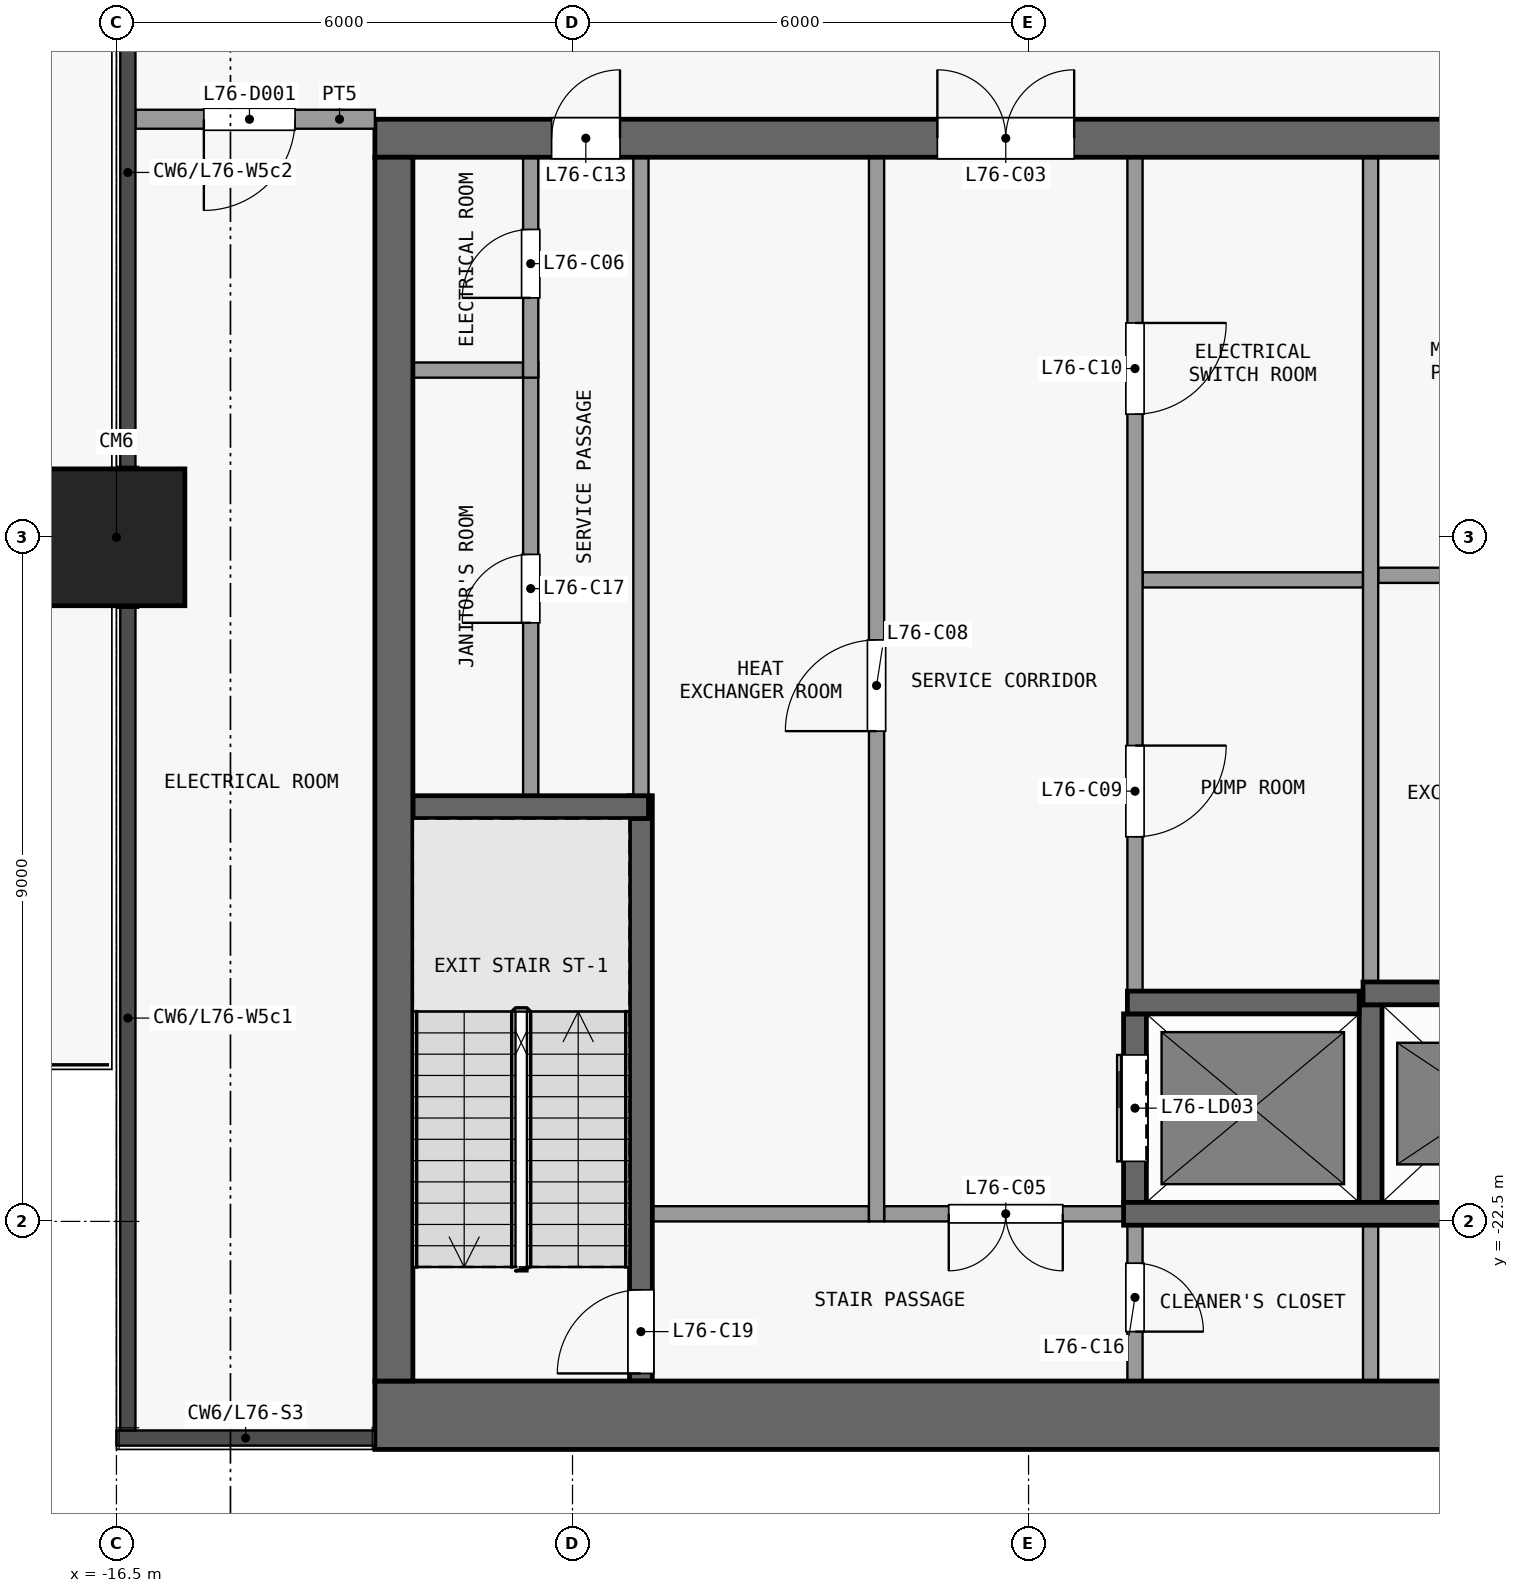
"""IFC4 building model, lengths in metres.
Left out: names, types, materials, properties, quantities, classifications, styles, units other than length and angle.
Written with IfcOpenShell. Run it as: python <this file> out.ifc"""

import sys

from ifc_helpers import new_model, si_unit, direction, frame, frame_2d, origin, origin_2d, place, context, subcontext, project, spatial, rectangle, extrude, element, fill, save


model = new_model("IFC4")
c1 = context("Model", 3, precision=1e-05, world=origin(), true_north=direction((0.0, 1.0)))
c2 = subcontext(c1, "Body", "Model", "MODEL_VIEW")
j1 = project(units=[si_unit("LENGTHUNIT", "METRE"), si_unit("PLANEANGLEUNIT", "RADIAN")], contexts=[c1])
p1 = place(None, origin())
s1 = spatial("IfcSite", under=j1, at=p1, CompositionType="ELEMENT")
p2 = place(p1, origin())
s2 = spatial("IfcBuilding", under=s1, at=p2, CompositionType="ELEMENT")
p3 = place(p2, frame((0.0, 0.0, 298.7)))
s3 = spatial("IfcBuildingStorey", under=s2, at=p3, CompositionType="ELEMENT", Elevation=298.7)
p4 = place(p3, frame((-16.5, -13.5, 0.0), z_axis=(0.0, 0.0, 1.0), x_axis=(1.0, 0.0, 0.0)))
e1 = element("IfcColumn", 1, at=p4, inside=s3, PredefinedType="COLUMN", context=c2, shape_type="SweptSolid", body=[
    extrude(rectangle(XDim=1.8, YDim=1.8, at=origin_2d()), origin(), (0.0, 0.0, 1.0), 4.5),
])
p5 = place(p3, frame((-13.1, -25.05, 0.0), z_axis=(0.0, 0.0, 1.0), x_axis=(1.0, 0.0, 0.0)))
e2 = element("IfcWall", 2, at=p5, inside=s3, PredefinedType="SHEAR", context=c2, shape_type="SweptSolid", body=[
    extrude(rectangle(XDim=26.2, YDim=0.9, at=frame_2d((13.1, 0.0))), origin(), (0.0, 0.0, 1.0), 4.2),
])
p6 = place(p3, frame((-13.1, -8.25, 0.0), z_axis=(0.0, 0.0, 1.0), x_axis=(1.0, 0.0, 0.0)))
e3 = element("IfcWall", 3, at=p6, inside=s3, PredefinedType="SHEAR", context=c2, shape_type="SweptSolid", body=[
    extrude(rectangle(XDim=26.2, YDim=0.5, at=frame_2d((13.1, 0.0))), origin(), (0.0, 0.0, 1.0), 4.2),
])
p7 = place(p6, frame((7.4, 0.0, 0.0)))
e4 = element("IfcOpeningElement", 4, at=p7, cuts=e3, PredefinedType="OPENING", context=c2, shape_type="SweptSolid", body=[
    extrude(rectangle(XDim=1.8, YDim=2.1, at=frame_2d((0.9, 1.05))), frame((0.0, 0.26, 0.0), z_axis=(0.0, -1.0, 0.0), x_axis=(1.0, 0.0, 0.0)), (0.0, 0.0, 1.0), 0.52),
])
p8 = place(p6, frame((17.0, 0.0, 0.0)))
e5 = element("IfcOpeningElement", 5, at=p8, cuts=e3, PredefinedType="OPENING", context=c2, shape_type="SweptSolid", body=[
    extrude(rectangle(XDim=1.8, YDim=2.1, at=frame_2d((0.9, 1.05))), frame((0.0, 0.26, 0.0), z_axis=(0.0, -1.0, 0.0), x_axis=(1.0, 0.0, 0.0)), (0.0, 0.0, 1.0), 0.52),
])
p9 = place(p6, frame((2.325, 0.0, 0.0)))
e6 = element("IfcOpeningElement", 6, at=p9, cuts=e3, PredefinedType="OPENING", context=c2, shape_type="SweptSolid", body=[
    extrude(rectangle(XDim=0.9, YDim=2.1, at=frame_2d((0.45, 1.05))), frame((0.0, 0.26, 0.0), z_axis=(0.0, -1.0, 0.0), x_axis=(1.0, 0.0, 0.0)), (0.0, 0.0, 1.0), 0.52),
])
p10 = place(p6, frame((22.975, 0.0, 0.0)))
e7 = element("IfcOpeningElement", 7, at=p10, cuts=e3, PredefinedType="OPENING", context=c2, shape_type="SweptSolid", body=[
    extrude(rectangle(XDim=0.9, YDim=2.1, at=frame_2d((0.45, 1.05))), frame((0.0, 0.26, 0.0), z_axis=(0.0, -1.0, 0.0), x_axis=(1.0, 0.0, 0.0)), (0.0, 0.0, 1.0), 0.52),
])
p11 = place(p3, frame((-12.85, -24.6, 0.0), z_axis=(0.0, 0.0, 1.0), x_axis=(0.0, 1.0, 0.0)))
e8 = element("IfcWall", 8, at=p11, inside=s3, PredefinedType="SHEAR", context=c2, shape_type="SweptSolid", body=[
    extrude(rectangle(XDim=16.1, YDim=0.5, at=frame_2d((8.05, 0.0))), origin(), (0.0, 0.0, 1.0), 4.2),
])
p12 = place(p3, frame((-9.45, -22.4, 0.0), z_axis=(0.0, 0.0, 1.0), x_axis=(1.0, 0.0, 0.0)))
e9 = element("IfcWall", 9, at=p12, inside=s3, PredefinedType="PARTITIONING", context=c2, shape_type="SweptSolid", body=[
    extrude(rectangle(XDim=2.85, YDim=0.2, at=frame_2d((1.425, 0.0))), origin(), (0.0, 0.0, 1.0), 4.2),
])
p13 = place(p3, frame((-3.25, -22.4, 0.0), z_axis=(0.0, 0.0, 1.0), x_axis=(-1.0, 0.0, 0.0)))
e10 = element("IfcWall", 10, at=p13, inside=s3, PredefinedType="PARTITIONING", context=c2, shape_type="SweptSolid", body=[
    extrude(rectangle(XDim=3.15, YDim=0.2, at=frame_2d((1.575, 0.0))), origin(), (0.0, 0.0, 1.0), 4.2),
])
p14 = place(p13, frame((0.8, 0.0, 0.0)))
e11 = element("IfcOpeningElement", 11, at=p14, cuts=e10, PredefinedType="OPENING", context=c2, shape_type="SweptSolid", body=[
    extrude(rectangle(XDim=1.5, YDim=2.1, at=frame_2d((0.75, 1.05))), frame((0.0, 0.11, 0.0), z_axis=(0.0, -1.0, 0.0), x_axis=(1.0, 0.0, 0.0)), (0.0, 0.0, 1.0), 0.22),
])
p15 = place(p3, frame((-3.25, -22.4, 0.0), z_axis=(0.0, 0.0, 1.0), x_axis=(1.0, 0.0, 0.0)))
e12 = element("IfcWall", 12, at=p15, inside=s3, PredefinedType="SHEAR", context=c2, shape_type="SweptSolid", body=[
    extrude(rectangle(XDim=6.5, YDim=0.3, at=frame_2d((3.25, 0.0))), origin(), (0.0, 0.0, 1.0), 4.2),
])
p16 = place(p3, frame((-3.2, -19.62, 0.0), z_axis=(0.0, 0.0, 1.0), x_axis=(1.0, 0.0, 0.0)))
e13 = element("IfcWall", 13, at=p16, inside=s3, PredefinedType="SHEAR", context=c2, shape_type="SweptSolid", body=[
    extrude(rectangle(XDim=3.05, YDim=0.3, at=frame_2d((1.525, 0.0))), origin(), (0.0, 0.0, 1.0), 4.2),
])
p17 = place(p3, frame((-0.1, -19.5, 0.0), z_axis=(0.0, 0.0, 1.0), x_axis=(1.0, 0.0, 0.0)))
e14 = element("IfcWall", 14, at=p17, inside=s3, PredefinedType="SHEAR", context=c2, shape_type="SweptSolid", body=[
    extrude(rectangle(XDim=3.3, YDim=0.3, at=frame_2d((1.65, 0.0))), origin(), (0.0, 0.0, 1.0), 4.2),
])
p18 = place(p3, frame((-12.6, -17.05, 0.0), z_axis=(0.0, 0.0, 1.0), x_axis=(1.0, 0.0, 0.0)))
e15 = element("IfcWall", 15, at=p18, inside=s3, PredefinedType="SHEAR", context=c2, shape_type="SweptSolid", body=[
    extrude(rectangle(XDim=3.1, YDim=0.3, at=frame_2d((1.55, 0.0))), origin(), (0.0, 0.0, 1.0), 4.2),
])
for number, where, z_axis, x_axis in (
    (16, (-3.0, -14.06, 0.0), (0.0, 0.0, 1.0), (1.0, 0.0, 0.0)),
    (17, (0.1, -14.0, 0.0), (0.0, 0.0, 1.0), (1.0, 0.0, 0.0)),
):
    element("IfcWall", number, at=place(p3, frame(where, z_axis=z_axis, x_axis=x_axis)), inside=s3, PredefinedType="PARTITIONING", context=c2, shape_type="SweptSolid", body=[
        extrude(rectangle(XDim=2.9, YDim=0.2, at=frame_2d((1.45, 0.0))), origin(), (0.0, 0.0, 1.0), 4.2),
    ])
p19 = place(p3, frame((-12.6, -11.3, 0.0), z_axis=(0.0, 0.0, 1.0), x_axis=(1.0, 0.0, 0.0)))
e18 = element("IfcWall", 18, at=p19, inside=s3, PredefinedType="PARTITIONING", context=c2, shape_type="SweptSolid", body=[
    extrude(rectangle(XDim=1.45, YDim=0.2, at=frame_2d((0.725, 0.0))), origin(), (0.0, 0.0, 1.0), 4.2),
])
p20 = place(p3, frame((-11.05, -16.9, 0.0), z_axis=(0.0, 0.0, 1.0), x_axis=(0.0, 1.0, 0.0)))
e19 = element("IfcWall", 19, at=p20, inside=s3, PredefinedType="PARTITIONING", context=c2, shape_type="SweptSolid", body=[
    extrude(rectangle(XDim=5.7, YDim=0.2, at=frame_2d((2.85, 0.0))), origin(), (0.0, 0.0, 1.0), 4.2),
])
p21 = place(p20, frame((2.275, 0.0, 0.0)))
e20 = element("IfcOpeningElement", 20, at=p21, cuts=e19, PredefinedType="OPENING", context=c2, shape_type="SweptSolid", body=[
    extrude(rectangle(XDim=0.9, YDim=2.1, at=frame_2d((0.45, 1.05))), frame((0.0, 0.11, 0.0), z_axis=(0.0, -1.0, 0.0), x_axis=(1.0, 0.0, 0.0)), (0.0, 0.0, 1.0), 0.22),
])
p22 = place(p3, frame((-11.05, -11.4, 0.0), z_axis=(0.0, 0.0, 1.0), x_axis=(0.0, 1.0, 0.0)))
e21 = element("IfcWall", 21, at=p22, inside=s3, PredefinedType="PARTITIONING", context=c2, shape_type="SweptSolid", body=[
    extrude(rectangle(XDim=2.9, YDim=0.2, at=frame_2d((1.45, 0.0))), origin(), (0.0, 0.0, 1.0), 4.2),
])
p23 = place(p22, frame((1.05, 0.0, 0.0)))
e22 = element("IfcOpeningElement", 22, at=p23, cuts=e21, PredefinedType="OPENING", context=c2, shape_type="SweptSolid", body=[
    extrude(rectangle(XDim=0.9, YDim=2.1, at=frame_2d((0.45, 1.05))), frame((0.0, 0.11, 0.0), z_axis=(0.0, -1.0, 0.0), x_axis=(1.0, 0.0, 0.0)), (0.0, 0.0, 1.0), 0.22),
])
p24 = place(p3, frame((-9.6, -24.6, 0.0), z_axis=(0.0, 0.0, 1.0), x_axis=(0.0, 1.0, 0.0)))
e23 = element("IfcWall", 23, at=p24, inside=s3, PredefinedType="SHEAR", context=c2, shape_type="SweptSolid", body=[
    extrude(rectangle(XDim=7.7, YDim=0.3, at=frame_2d((3.85, 0.0))), origin(), (0.0, 0.0, 1.0), 4.2),
])
p25 = place(p24, frame((0.1, 0.0, 0.0)))
e24 = element("IfcOpeningElement", 24, at=p25, cuts=e23, PredefinedType="OPENING", context=c2, shape_type="SweptSolid", body=[
    extrude(rectangle(XDim=1.1, YDim=2.1, at=frame_2d((0.55, 1.05))), frame((0.0, 0.16, 0.0), z_axis=(0.0, -1.0, 0.0), x_axis=(1.0, 0.0, 0.0)), (0.0, 0.0, 1.0), 0.32),
])
p26 = place(p3, frame((-9.6, -16.9, 0.0), z_axis=(0.0, 0.0, 1.0), x_axis=(0.0, 1.0, 0.0)))
e25 = element("IfcWall", 25, at=p26, inside=s3, PredefinedType="PARTITIONING", context=c2, shape_type="SweptSolid", body=[
    extrude(rectangle(XDim=8.4, YDim=0.2, at=frame_2d((4.2, 0.0))), origin(), (0.0, 0.0, 1.0), 4.2),
])
p27 = place(p3, frame((-6.5, -22.5, 0.0), z_axis=(0.0, 0.0, 1.0), x_axis=(0.0, 1.0, 0.0)))
e26 = element("IfcWall", 26, at=p27, inside=s3, PredefinedType="PARTITIONING", context=c2, shape_type="SweptSolid", body=[
    extrude(rectangle(XDim=14.0, YDim=0.2, at=frame_2d((7.0, 0.0))), origin(), (0.0, 0.0, 1.0), 4.2),
])
p28 = place(p27, frame((6.45, 0.0, 0.0)))
e27 = element("IfcOpeningElement", 27, at=p28, cuts=e26, PredefinedType="OPENING", context=c2, shape_type="SweptSolid", body=[
    extrude(rectangle(XDim=1.2, YDim=2.1, at=frame_2d((0.6, 1.05))), frame((0.0, 0.11, 0.0), z_axis=(0.0, -1.0, 0.0), x_axis=(1.0, 0.0, 0.0)), (0.0, 0.0, 1.0), 0.22),
])
p29 = place(p3, frame((-3.1, -22.55, 0.0), z_axis=(0.0, 0.0, 1.0), x_axis=(0.0, -1.0, 0.0)))
e28 = element("IfcWall", 28, at=p29, inside=s3, PredefinedType="PARTITIONING", context=c2, shape_type="SweptSolid", body=[
    extrude(rectangle(XDim=2.05, YDim=0.2, at=frame_2d((1.025, 0.0))), origin(), (0.0, 0.0, 1.0), 4.2),
])
p30 = place(p29, frame((0.5, 0.0, 0.0)))
e29 = element("IfcOpeningElement", 29, at=p30, cuts=e28, PredefinedType="OPENING", context=c2, shape_type="SweptSolid", body=[
    extrude(rectangle(XDim=0.9, YDim=2.1, at=frame_2d((0.45, 1.05))), frame((0.0, 0.11, 0.0), z_axis=(0.0, -1.0, 0.0), x_axis=(1.0, 0.0, 0.0)), (0.0, 0.0, 1.0), 0.22),
])
p31 = place(p3, frame((-3.1, -22.25, 0.0), z_axis=(0.0, 0.0, 1.0), x_axis=(0.0, 1.0, 0.0)))
e30 = element("IfcWall", 30, at=p31, inside=s3, PredefinedType="SHEAR", context=c2, shape_type="SweptSolid", body=[
    extrude(rectangle(XDim=2.48, YDim=0.3, at=frame_2d((1.24, 0.0))), origin(), (0.0, 0.0, 1.0), 4.2),
])
p32 = place(p31, frame((0.54, 0.0, 0.0)))
e31 = element("IfcOpeningElement", 31, at=p32, cuts=e30, PredefinedType="OPENING", context=c2, shape_type="SweptSolid", body=[
    extrude(rectangle(XDim=1.4, YDim=2.1, at=frame_2d((0.7, 1.05))), frame((0.0, 0.16, 0.0), z_axis=(0.0, -1.0, 0.0), x_axis=(1.0, 0.0, 0.0)), (0.0, 0.0, 1.0), 0.32),
])
p33 = place(p3, frame((-3.1, -8.5, 0.0), z_axis=(0.0, 0.0, 1.0), x_axis=(0.0, -1.0, 0.0)))
e32 = element("IfcWall", 32, at=p33, inside=s3, PredefinedType="PARTITIONING", context=c2, shape_type="SweptSolid", body=[
    extrude(rectangle(XDim=10.97, YDim=0.2, at=frame_2d((5.485, 0.0))), origin(), (0.0, 0.0, 1.0), 4.2),
])
p34 = place(p33, frame((7.74, 0.0, 0.0)))
e33 = element("IfcOpeningElement", 33, at=p34, cuts=e32, PredefinedType="OPENING", context=c2, shape_type="SweptSolid", body=[
    extrude(rectangle(XDim=1.2, YDim=2.1, at=frame_2d((0.6, 1.05))), frame((0.0, 0.11, 0.0), z_axis=(0.0, -1.0, 0.0), x_axis=(1.0, 0.0, 0.0)), (0.0, 0.0, 1.0), 0.22),
])
p35 = place(p33, frame((2.18, 0.0, 0.0)))
e34 = element("IfcOpeningElement", 34, at=p35, cuts=e32, PredefinedType="OPENING", context=c2, shape_type="SweptSolid", body=[
    extrude(rectangle(XDim=1.2, YDim=2.1, at=frame_2d((0.6, 1.05))), frame((0.0, 0.11, 0.0), z_axis=(0.0, -1.0, 0.0), x_axis=(1.0, 0.0, 0.0)), (0.0, 0.0, 1.0), 0.22),
])
p36 = place(p3, frame((0.0, -24.6, 0.0), z_axis=(0.0, 0.0, 1.0), x_axis=(0.0, 1.0, 0.0)))
e35 = element("IfcWall", 35, at=p36, inside=s3, PredefinedType="PARTITIONING", context=c2, shape_type="SweptSolid", body=[
    extrude(rectangle(XDim=2.05, YDim=0.2, at=frame_2d((1.025, 0.0))), origin(), (0.0, 0.0, 1.0), 4.2),
])
p37 = place(p3, frame((0.0, -22.25, 0.0), z_axis=(0.0, 0.0, 1.0), x_axis=(0.0, 1.0, 0.0)))
e36 = element("IfcWall", 36, at=p37, inside=s3, PredefinedType="SHEAR", context=c2, shape_type="SweptSolid", body=[
    extrude(rectangle(XDim=2.6, YDim=0.3, at=frame_2d((1.3, 0.0))), origin(), (0.0, 0.0, 1.0), 4.2),
])
p38 = place(p3, frame((0.0, -19.35, 0.0), z_axis=(0.0, 0.0, 1.0), x_axis=(0.0, 1.0, 0.0)))
e37 = element("IfcWall", 37, at=p38, inside=s3, PredefinedType="PARTITIONING", context=c2, shape_type="SweptSolid", body=[
    extrude(rectangle(XDim=10.85, YDim=0.2, at=frame_2d((5.425, 0.0))), origin(), (0.0, 0.0, 1.0), 4.2),
])
p39 = place(p3, frame((-16.25, -8.0, 0.0), z_axis=(0.0, 0.0, 1.0), x_axis=(1.0, 0.0, 0.0)))
e38 = element("IfcWall", 38, at=p39, inside=s3, PredefinedType="PARTITIONING", context=c2, shape_type="SweptSolid", body=[
    extrude(rectangle(XDim=3.15, YDim=0.25, at=frame_2d((1.575, 0.0))), origin(), (0.0, 0.0, 1.0), 4.2),
])
p40 = place(p39, frame((0.9, 0.0, 0.0)))
e39 = element("IfcOpeningElement", 39, at=p40, cuts=e38, PredefinedType="OPENING", context=c2, shape_type="SweptSolid", body=[
    extrude(rectangle(XDim=1.2, YDim=2.1, at=frame_2d((0.6, 1.05))), frame((0.0, 0.135, 0.0), z_axis=(0.0, -1.0, 0.0), x_axis=(1.0, 0.0, 0.0)), (0.0, 0.0, 1.0), 0.27),
])
p41 = place(p32, origin())
e40 = element("IfcDoor", 40, at=p41, inside=s3, OperationType="DOUBLE_DOOR_SLIDING", PredefinedType="DOOR", context=c2, shape_type="SweptSolid", body=[
    extrude(rectangle(XDim=1.4, YDim=2.1, at=frame_2d((0.7, 1.05))), frame((0.0, 0.025, 0.0), z_axis=(0.0, -1.0, 0.0), x_axis=(1.0, 0.0, 0.0)), (0.0, 0.0, 1.0), 0.05),
])
fill(e31, e40)
p42 = place(p7, origin())
e41 = element("IfcDoor", 41, at=p42, inside=s3, OperationType="DOUBLE_DOOR_SINGLE_SWING", PredefinedType="DOOR", context=c2, shape_type="SweptSolid", body=[
    extrude(rectangle(XDim=1.8, YDim=2.1, at=frame_2d((0.9, 1.05))), frame((0.0, 0.025, 0.0), z_axis=(0.0, -1.0, 0.0), x_axis=(1.0, 0.0, 0.0)), (0.0, 0.0, 1.0), 0.05),
])
fill(e4, e41)
p43 = place(p14, origin())
e42 = element("IfcDoor", 42, at=p43, inside=s3, OperationType="DOUBLE_DOOR_SINGLE_SWING", PredefinedType="DOOR", context=c2, shape_type="SweptSolid", body=[
    extrude(rectangle(XDim=1.5, YDim=2.1, at=frame_2d((0.75, 1.05))), frame((0.0, 0.025, 0.0), z_axis=(0.0, -1.0, 0.0), x_axis=(1.0, 0.0, 0.0)), (0.0, 0.0, 1.0), 0.05),
])
fill(e11, e42)
p44 = place(p23, origin())
e43 = element("IfcDoor", 43, at=p44, inside=s3, OperationType="SINGLE_SWING_LEFT", PredefinedType="DOOR", context=c2, shape_type="SweptSolid", body=[
    extrude(rectangle(XDim=0.9, YDim=2.1, at=frame_2d((0.45, 1.05))), frame((0.0, 0.025, 0.0), z_axis=(0.0, -1.0, 0.0), x_axis=(1.0, 0.0, 0.0)), (0.0, 0.0, 1.0), 0.05),
])
fill(e22, e43)
p45 = place(p28, origin())
e44 = element("IfcDoor", 44, at=p45, inside=s3, OperationType="SINGLE_SWING_LEFT", PredefinedType="DOOR", context=c2, shape_type="SweptSolid", body=[
    extrude(rectangle(XDim=1.2, YDim=2.1, at=frame_2d((0.6, 1.05))), frame((0.0, 0.025, 0.0), z_axis=(0.0, -1.0, 0.0), x_axis=(1.0, 0.0, 0.0)), (0.0, 0.0, 1.0), 0.05),
])
fill(e27, e44)
p46 = place(p34, origin())
e45 = element("IfcDoor", 45, at=p46, inside=s3, OperationType="SINGLE_SWING_LEFT", PredefinedType="DOOR", context=c2, shape_type="SweptSolid", body=[
    extrude(rectangle(XDim=1.2, YDim=2.1, at=frame_2d((0.6, 1.05))), frame((0.0, 0.025, 0.0), z_axis=(0.0, -1.0, 0.0), x_axis=(1.0, 0.0, 0.0)), (0.0, 0.0, 1.0), 0.05),
])
fill(e33, e45)
p47 = place(p35, origin())
e46 = element("IfcDoor", 46, at=p47, inside=s3, OperationType="SINGLE_SWING_LEFT", PredefinedType="DOOR", context=c2, shape_type="SweptSolid", body=[
    extrude(rectangle(XDim=1.2, YDim=2.1, at=frame_2d((0.6, 1.05))), frame((0.0, 0.025, 0.0), z_axis=(0.0, -1.0, 0.0), x_axis=(1.0, 0.0, 0.0)), (0.0, 0.0, 1.0), 0.05),
])
fill(e34, e46)
p48 = place(p9, origin())
e47 = element("IfcDoor", 47, at=p48, inside=s3, OperationType="SINGLE_SWING_RIGHT", PredefinedType="DOOR", context=c2, shape_type="SweptSolid", body=[
    extrude(rectangle(XDim=0.9, YDim=2.1, at=frame_2d((0.45, 1.05))), frame((0.0, 0.025, 0.0), z_axis=(0.0, -1.0, 0.0), x_axis=(1.0, 0.0, 0.0)), (0.0, 0.0, 1.0), 0.05),
])
fill(e6, e47)
p49 = place(p30, origin())
e48 = element("IfcDoor", 48, at=p49, inside=s3, OperationType="SINGLE_SWING_RIGHT", PredefinedType="DOOR", context=c2, shape_type="SweptSolid", body=[
    extrude(rectangle(XDim=0.9, YDim=2.1, at=frame_2d((0.45, 1.05))), frame((0.0, 0.025, 0.0), z_axis=(0.0, -1.0, 0.0), x_axis=(1.0, 0.0, 0.0)), (0.0, 0.0, 1.0), 0.05),
])
fill(e29, e48)
p50 = place(p21, origin())
e49 = element("IfcDoor", 49, at=p50, inside=s3, OperationType="SINGLE_SWING_LEFT", PredefinedType="DOOR", context=c2, shape_type="SweptSolid", body=[
    extrude(rectangle(XDim=0.9, YDim=2.1, at=frame_2d((0.45, 1.05))), frame((0.0, 0.025, 0.0), z_axis=(0.0, -1.0, 0.0), x_axis=(1.0, 0.0, 0.0)), (0.0, 0.0, 1.0), 0.05),
])
fill(e20, e49)
p51 = place(p25, origin())
e50 = element("IfcDoor", 50, at=p51, inside=s3, OperationType="SINGLE_SWING_LEFT", PredefinedType="DOOR", context=c2, shape_type="SweptSolid", body=[
    extrude(rectangle(XDim=1.1, YDim=2.1, at=frame_2d((0.55, 1.05))), frame((0.0, 0.025, 0.0), z_axis=(0.0, -1.0, 0.0), x_axis=(1.0, 0.0, 0.0)), (0.0, 0.0, 1.0), 0.05),
])
fill(e24, e50)
p52 = place(p40, origin())
e51 = element("IfcDoor", 51, at=p52, inside=s3, OperationType="SINGLE_SWING_LEFT", PredefinedType="DOOR", context=c2, shape_type="SweptSolid", body=[
    extrude(rectangle(XDim=1.2, YDim=2.1, at=frame_2d((0.6, 1.05))), frame((0.0, 0.025, 0.0), z_axis=(0.0, -1.0, 0.0), x_axis=(1.0, 0.0, 0.0)), (0.0, 0.0, 1.0), 0.05),
])
fill(e39, e51)
save(model, sys.argv[1])
